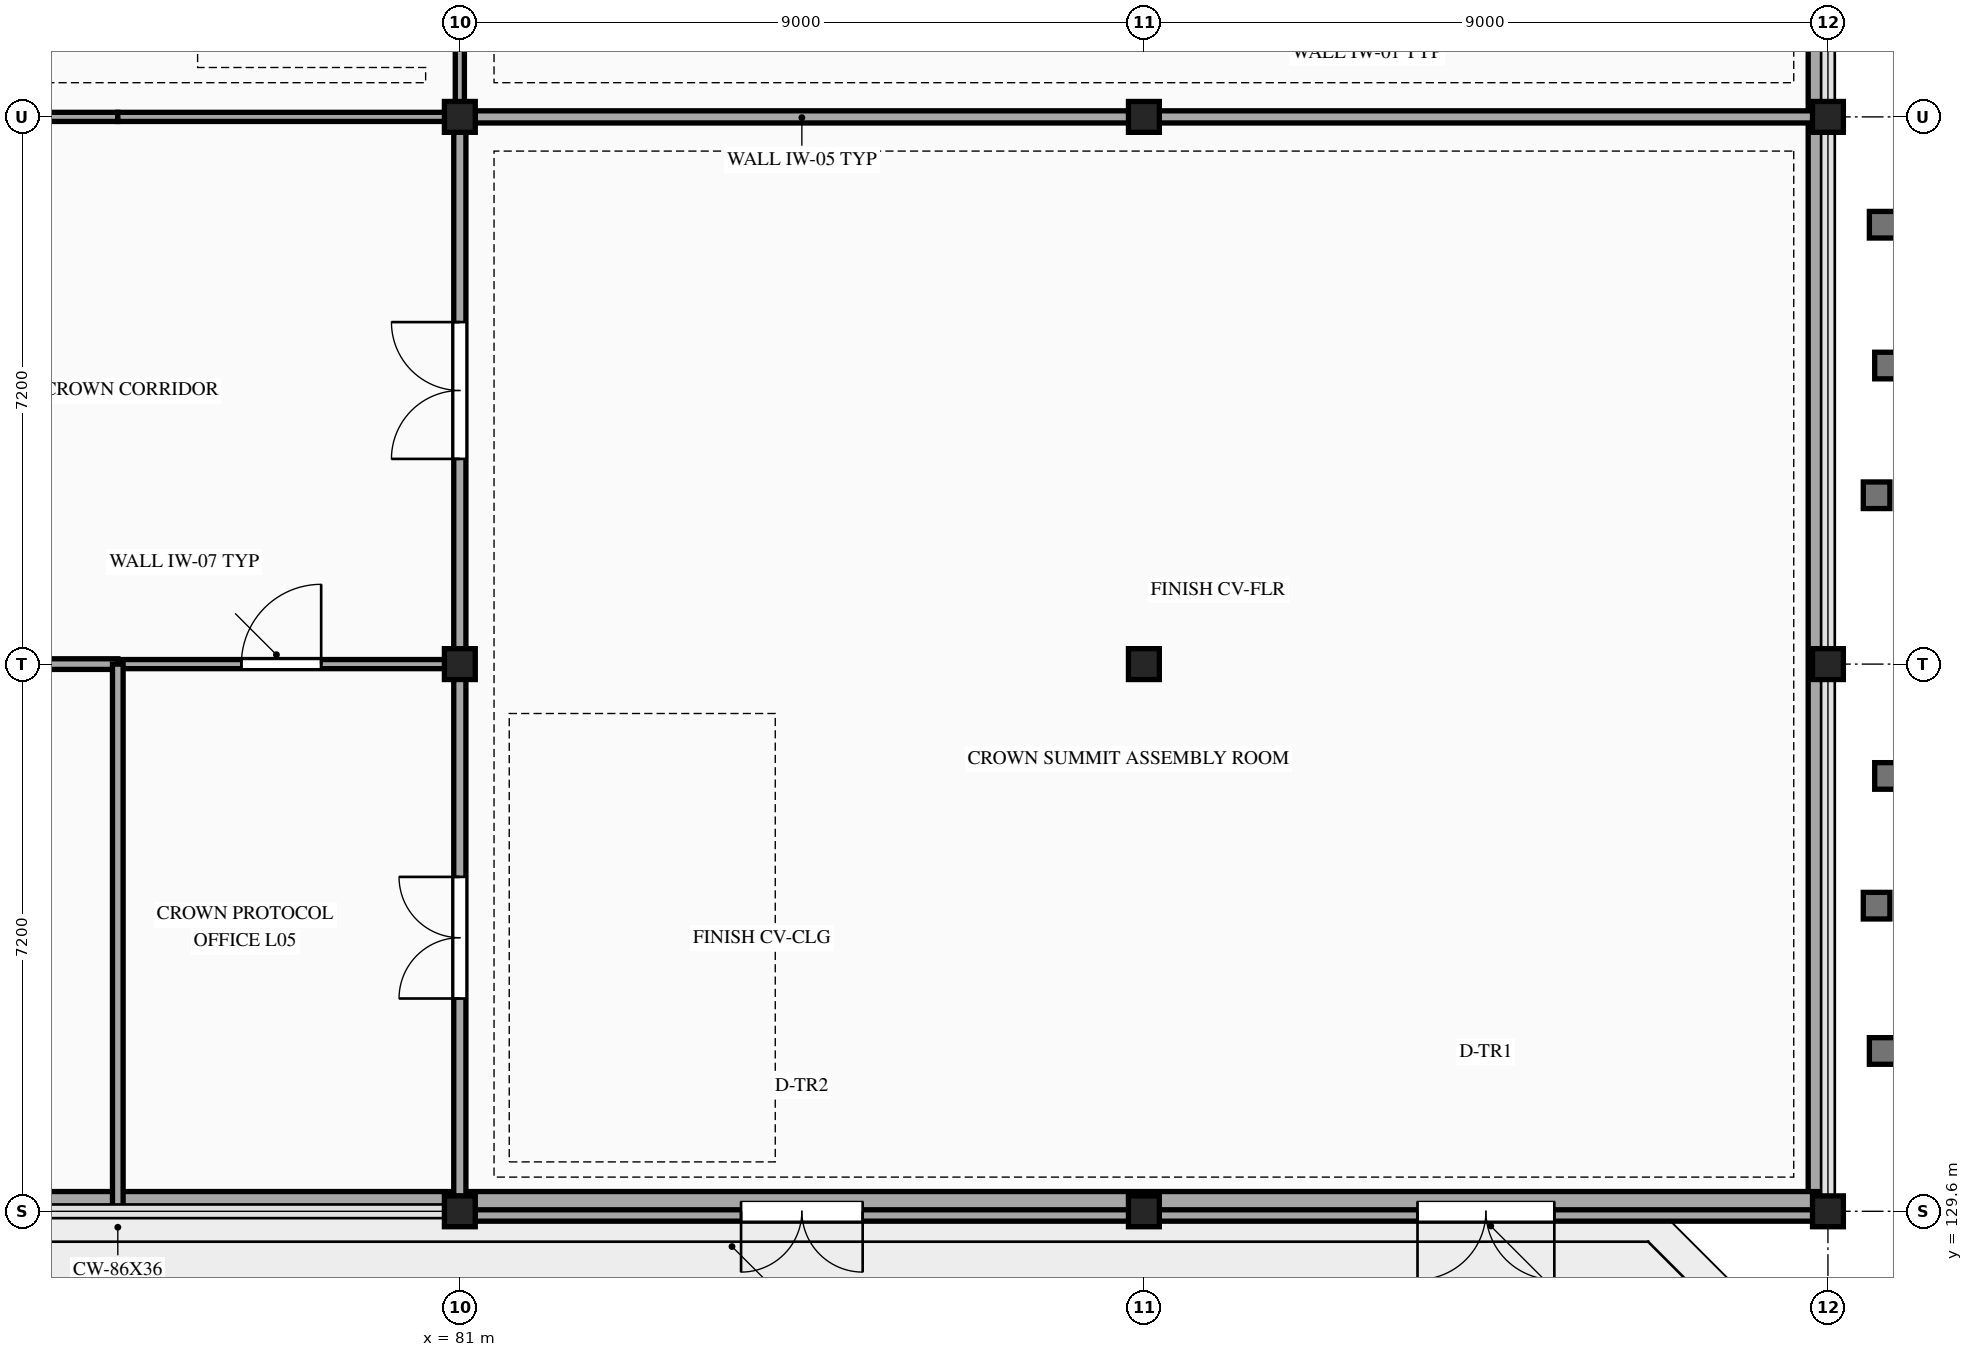
"""IFC4 building model, lengths in metres.
Left out: names, types, materials, properties, quantities, classifications, styles, units other than length and angle.
Written with IfcOpenShell. Run it as: python <this file> out.ifc"""

import sys

from ifc_helpers import new_model, si_unit, direction, frame, frame_2d, origin, origin_2d, place, context, subcontext, project, spatial, rectangle, hollow_circle, extrude, element, fill, save


model = new_model("IFC4")
c1 = context("Model", 3, precision=1e-05, world=origin(), true_north=direction((0.0, 1.0)))
c2 = subcontext(c1, "Body", "Model", "MODEL_VIEW")
j1 = project(units=[si_unit("LENGTHUNIT", "METRE"), si_unit("PLANEANGLEUNIT", "RADIAN")], contexts=[c1])
p1 = place(None, origin())
s1 = spatial("IfcSite", under=j1, at=p1, CompositionType="ELEMENT")
p2 = place(p1, origin())
s2 = spatial("IfcBuilding", under=s1, at=p2, CompositionType="ELEMENT")
p3 = place(p2, frame((0.0, 0.0, 24.3)))
s3 = spatial("IfcBuildingStorey", under=s2, at=p3, CompositionType="ELEMENT", Elevation=24.3)
for number, where, z_axis, x_axis in (
    (1, (81.0, 129.6, 0.0), (0.0, 0.0, 1.0), (1.0, 0.0, 0.0)),
    (2, (81.0, 136.8, 0.0), (0.0, 0.0, 1.0), (1.0, 0.0, 0.0)),
    (3, (81.0, 144.0, 0.0), (0.0, 0.0, 1.0), (1.0, 0.0, 0.0)),
    (4, (90.0, 129.6, 0.0), (0.0, 0.0, 1.0), (1.0, 0.0, 0.0)),
    (5, (90.0, 136.8, 0.0), (0.0, 0.0, 1.0), (1.0, 0.0, 0.0)),
    (6, (90.0, 144.0, 0.0), (0.0, 0.0, 1.0), (1.0, 0.0, 0.0)),
    (7, (99.0, 129.6, 0.0), (0.0, 0.0, 1.0), (1.0, 0.0, 0.0)),
    (8, (99.0, 136.8, 0.0), (0.0, 0.0, 1.0), (1.0, 0.0, 0.0)),
    (9, (99.0, 144.0, 0.0), (0.0, 0.0, 1.0), (1.0, 0.0, 0.0)),
):
    element("IfcColumn", number, at=place(p3, frame(where, z_axis=z_axis, x_axis=x_axis)), inside=s3, PredefinedType="COLUMN", context=c2, shape_type="SweptSolid", body=[
        extrude(hollow_circle(Radius=0.203, WallThickness=0.014, at=origin_2d()), origin(), (0.0, 0.0, 1.0), 4.5),
    ])
p4 = place(p3, frame((98.801, 129.6, 0.0), z_axis=(0.0, 0.0, 1.0), x_axis=(-1.0, 0.0, 0.0)))
e10 = element("IfcWall", 10, at=p4, inside=s3, PredefinedType="STANDARD", context=c2, shape_type="SweptSolid", body=[
    extrude(rectangle(XDim=8.602, YDim=0.26, at=frame_2d((4.301, 0.0))), origin(), (0.0, 0.0, 1.0), 3.648),
])
p5 = place(p4, frame((3.401, 0.0, 0.0)))
e11 = element("IfcOpeningElement", 11, at=p5, cuts=e10, PredefinedType="OPENING", context=c2, shape_type="SweptSolid", body=[
    extrude(rectangle(XDim=1.8, YDim=2.25, at=frame_2d((0.9, 1.125))), frame((0.0, 0.14, 0.0), z_axis=(0.0, -1.0, 0.0), x_axis=(1.0, 0.0, 0.0)), (0.0, 0.0, 1.0), 0.28),
])
p6 = place(p3, frame((89.801, 129.6, 0.0), z_axis=(0.0, 0.0, 1.0), x_axis=(-1.0, 0.0, 0.0)))
e12 = element("IfcWall", 12, at=p6, inside=s3, PredefinedType="STANDARD", context=c2, shape_type="SweptSolid", body=[
    extrude(rectangle(XDim=8.602, YDim=0.26, at=frame_2d((4.301, 0.0))), origin(), (0.0, 0.0, 1.0), 3.648),
])
p7 = place(p6, frame((3.501, 0.0, 0.0)))
e13 = element("IfcOpeningElement", 13, at=p7, cuts=e12, PredefinedType="OPENING", context=c2, shape_type="SweptSolid", body=[
    extrude(rectangle(XDim=1.6, YDim=2.2, at=frame_2d((0.8, 1.1))), frame((0.0, 0.14, 0.0), z_axis=(0.0, -1.0, 0.0), x_axis=(1.0, 0.0, 0.0)), (0.0, 0.0, 1.0), 0.28),
])
p8 = place(p3, frame((98.86, 165.46, 4.5), z_axis=(0.0, 0.0, 1.0), x_axis=(0.0, -1.0, 0.0)))
e14 = element("IfcWall", 14, at=p8, inside=s3, PredefinedType="PARAPET", context=c2, shape_type="SweptSolid", body=[
    extrude(rectangle(XDim=35.72, YDim=0.24, at=frame_2d((17.86, 0.0))), origin(), (0.0, 0.0, 1.0), 0.65),
])
p9 = place(p3, frame((98.86, 129.74, 4.5), z_axis=(0.0, 0.0, 1.0), x_axis=(-1.0, 0.0, 0.0)))
e15 = element("IfcWall", 15, at=p9, inside=s3, PredefinedType="PARAPET", context=c2, shape_type="SweptSolid", body=[
    extrude(rectangle(XDim=26.86, YDim=0.24, at=frame_2d((13.43, 0.0))), origin(), (0.0, 0.0, 1.0), 0.65),
])
p10 = place(p3, frame((72.199, 136.8, 0.0), z_axis=(0.0, 0.0, 1.0), x_axis=(1.0, 0.0, 0.0)))
e16 = element("IfcWall", 16, at=p10, inside=s3, PredefinedType="PARTITIONING", context=c2, shape_type="SweptSolid", body=[
    extrude(rectangle(XDim=4.301, YDim=0.14, at=frame_2d((2.15, 0.0))), origin(), (0.0, 0.0, 1.0), 3.648),
])
p11 = place(p10, frame((1.676, 0.0, 0.0)))
e17 = element("IfcOpeningElement", 17, at=p11, cuts=e16, PredefinedType="OPENING", context=c2, shape_type="SweptSolid", body=[
    extrude(rectangle(XDim=0.95, YDim=2.1, at=frame_2d((0.475, 1.05))), frame((0.0, 0.08, 0.0), z_axis=(0.0, -1.0, 0.0), x_axis=(1.0, 0.0, 0.0)), (0.0, 0.0, 1.0), 0.16),
])
p12 = place(p3, frame((76.5, 136.8, 0.0), z_axis=(0.0, 0.0, 1.0), x_axis=(1.0, 0.0, 0.0)))
e18 = element("IfcWall", 18, at=p12, inside=s3, PredefinedType="PARTITIONING", context=c2, shape_type="SweptSolid", body=[
    extrude(rectangle(XDim=4.301, YDim=0.12, at=frame_2d((2.15, 0.0))), origin(), (0.0, 0.0, 1.0), 3.648),
])
p13 = place(p12, frame((1.625, 0.0, 0.0)))
e19 = element("IfcOpeningElement", 19, at=p13, cuts=e18, PredefinedType="OPENING", context=c2, shape_type="SweptSolid", body=[
    extrude(rectangle(XDim=1.05, YDim=2.15, at=frame_2d((0.525, 1.075))), frame((0.0, 0.07, 0.0), z_axis=(0.0, -1.0, 0.0), x_axis=(1.0, 0.0, 0.0)), (0.0, 0.0, 1.0), 0.14),
])
p14 = place(p3, frame((72.199, 144.0, 0.0), z_axis=(0.0, 0.0, 1.0), x_axis=(1.0, 0.0, 0.0)))
e20 = element("IfcWall", 20, at=p14, inside=s3, PredefinedType="PARTITIONING", context=c2, shape_type="SweptSolid", body=[
    extrude(rectangle(XDim=4.301, YDim=0.12, at=frame_2d((2.15, 0.0))), origin(), (0.0, 0.0, 1.0), 3.648),
])
p15 = place(p14, frame((1.625, 0.0, 0.0)))
e21 = element("IfcOpeningElement", 21, at=p15, cuts=e20, PredefinedType="OPENING", context=c2, shape_type="SweptSolid", body=[
    extrude(rectangle(XDim=1.05, YDim=2.15, at=frame_2d((0.525, 1.075))), frame((0.0, 0.07, 0.0), z_axis=(0.0, -1.0, 0.0), x_axis=(1.0, 0.0, 0.0)), (0.0, 0.0, 1.0), 0.14),
])
p16 = place(p3, frame((76.5, 144.0, 0.0), z_axis=(0.0, 0.0, 1.0), x_axis=(1.0, 0.0, 0.0)))
e22 = element("IfcWall", 22, at=p16, inside=s3, PredefinedType="PARTITIONING", context=c2, shape_type="SweptSolid", body=[
    extrude(rectangle(XDim=4.301, YDim=0.12, at=frame_2d((2.15, 0.0))), origin(), (0.0, 0.0, 1.0), 3.648),
])
for number, where, z_axis, x_axis in (
    (23, (81.199, 144.0, 0.0), (0.0, 0.0, 1.0), (1.0, 0.0, 0.0)),
    (24, (90.199, 144.0, 0.0), (0.0, 0.0, 1.0), (1.0, 0.0, 0.0)),
):
    element("IfcWall", number, at=place(p3, frame(where, z_axis=z_axis, x_axis=x_axis)), inside=s3, PredefinedType="PARTITIONING", context=c2, shape_type="SweptSolid", body=[
        extrude(rectangle(XDim=8.602, YDim=0.16, at=frame_2d((4.301, 0.0))), origin(), (0.0, 0.0, 1.0), 3.648),
    ])
p17 = place(p3, frame((76.5, 129.6, 0.0), z_axis=(0.0, 0.0, 1.0), x_axis=(0.0, 1.0, 0.0)))
e25 = element("IfcWall", 25, at=p17, inside=s3, PredefinedType="PARTITIONING", context=c2, shape_type="SweptSolid", body=[
    extrude(rectangle(XDim=7.2, YDim=0.14, at=frame_2d((3.6, 0.0))), origin(), (0.0, 0.0, 1.0), 3.648),
])
p18 = place(p3, frame((81.0, 129.799, 0.0), z_axis=(0.0, 0.0, 1.0), x_axis=(0.0, 1.0, 0.0)))
e26 = element("IfcWall", 26, at=p18, inside=s3, PredefinedType="PARTITIONING", context=c2, shape_type="SweptSolid", body=[
    extrude(rectangle(XDim=6.802, YDim=0.16, at=frame_2d((3.401, 0.0))), origin(), (0.0, 0.0, 1.0), 3.648),
])
p19 = place(p18, frame((2.601, 0.0, 0.0)))
e27 = element("IfcOpeningElement", 27, at=p19, cuts=e26, PredefinedType="OPENING", context=c2, shape_type="SweptSolid", body=[
    extrude(rectangle(XDim=1.6, YDim=2.2, at=frame_2d((0.8, 1.1))), frame((0.0, 0.09, 0.0), z_axis=(0.0, -1.0, 0.0), x_axis=(1.0, 0.0, 0.0)), (0.0, 0.0, 1.0), 0.18),
])
p20 = place(p3, frame((81.0, 136.999, 0.0), z_axis=(0.0, 0.0, 1.0), x_axis=(0.0, 1.0, 0.0)))
e28 = element("IfcWall", 28, at=p20, inside=s3, PredefinedType="PARTITIONING", context=c2, shape_type="SweptSolid", body=[
    extrude(rectangle(XDim=6.802, YDim=0.16, at=frame_2d((3.401, 0.0))), origin(), (0.0, 0.0, 1.0), 3.648),
])
p21 = place(p20, frame((2.501, 0.0, 0.0)))
e29 = element("IfcOpeningElement", 29, at=p21, cuts=e28, PredefinedType="OPENING", context=c2, shape_type="SweptSolid", body=[
    extrude(rectangle(XDim=1.8, YDim=2.25, at=frame_2d((0.9, 1.125))), frame((0.0, 0.09, 0.0), z_axis=(0.0, -1.0, 0.0), x_axis=(1.0, 0.0, 0.0)), (0.0, 0.0, 1.0), 0.18),
])
p22 = place(p3, frame((81.0, 144.199, 0.0), z_axis=(0.0, 0.0, 1.0), x_axis=(0.0, 1.0, 0.0)))
e30 = element("IfcWall", 30, at=p22, inside=s3, PredefinedType="PARTITIONING", context=c2, shape_type="SweptSolid", body=[
    extrude(rectangle(XDim=6.802, YDim=0.12, at=frame_2d((3.401, 0.0))), origin(), (0.0, 0.0, 1.0), 3.648),
])
p23 = place(p5, origin())
e31 = element("IfcDoor", 31, at=p23, inside=s3, OperationType="DOUBLE_DOOR_SINGLE_SWING", PredefinedType="DOOR", context=c2, shape_type="SweptSolid", body=[
    extrude(rectangle(XDim=1.8, YDim=2.25, at=frame_2d((0.9, 1.125))), frame((0.0, 0.025, 0.0), z_axis=(0.0, -1.0, 0.0), x_axis=(1.0, 0.0, 0.0)), (0.0, 0.0, 1.0), 0.05),
])
fill(e11, e31)
p24 = place(p7, origin())
e32 = element("IfcDoor", 32, at=p24, inside=s3, OperationType="DOUBLE_DOOR_SINGLE_SWING", PredefinedType="DOOR", context=c2, shape_type="SweptSolid", body=[
    extrude(rectangle(XDim=1.6, YDim=2.2, at=frame_2d((0.8, 1.1))), frame((0.0, 0.025, 0.0), z_axis=(0.0, -1.0, 0.0), x_axis=(1.0, 0.0, 0.0)), (0.0, 0.0, 1.0), 0.05),
])
fill(e13, e32)
p25 = place(p13, origin())
e33 = element("IfcDoor", 33, at=p25, inside=s3, OperationType="SINGLE_SWING_RIGHT", PredefinedType="DOOR", context=c2, shape_type="SweptSolid", body=[
    extrude(rectangle(XDim=1.05, YDim=2.15, at=frame_2d((0.525, 1.075))), frame((0.0, 0.025, 0.0), z_axis=(0.0, -1.0, 0.0), x_axis=(1.0, 0.0, 0.0)), (0.0, 0.0, 1.0), 0.05),
])
fill(e19, e33)
p26 = place(p19, origin())
e34 = element("IfcDoor", 34, at=p26, inside=s3, OperationType="DOUBLE_DOOR_SINGLE_SWING", PredefinedType="DOOR", context=c2, shape_type="SweptSolid", body=[
    extrude(rectangle(XDim=1.6, YDim=2.2, at=frame_2d((0.8, 1.1))), frame((0.0, 0.025, 0.0), z_axis=(0.0, -1.0, 0.0), x_axis=(1.0, 0.0, 0.0)), (0.0, 0.0, 1.0), 0.05),
])
fill(e27, e34)
p27 = place(p21, origin())
e35 = element("IfcDoor", 35, at=p27, inside=s3, OperationType="DOUBLE_DOOR_SINGLE_SWING", PredefinedType="DOOR", context=c2, shape_type="SweptSolid", body=[
    extrude(rectangle(XDim=1.8, YDim=2.25, at=frame_2d((0.9, 1.125))), frame((0.0, 0.025, 0.0), z_axis=(0.0, -1.0, 0.0), x_axis=(1.0, 0.0, 0.0)), (0.0, 0.0, 1.0), 0.05),
])
fill(e29, e35)
save(model, sys.argv[1])
